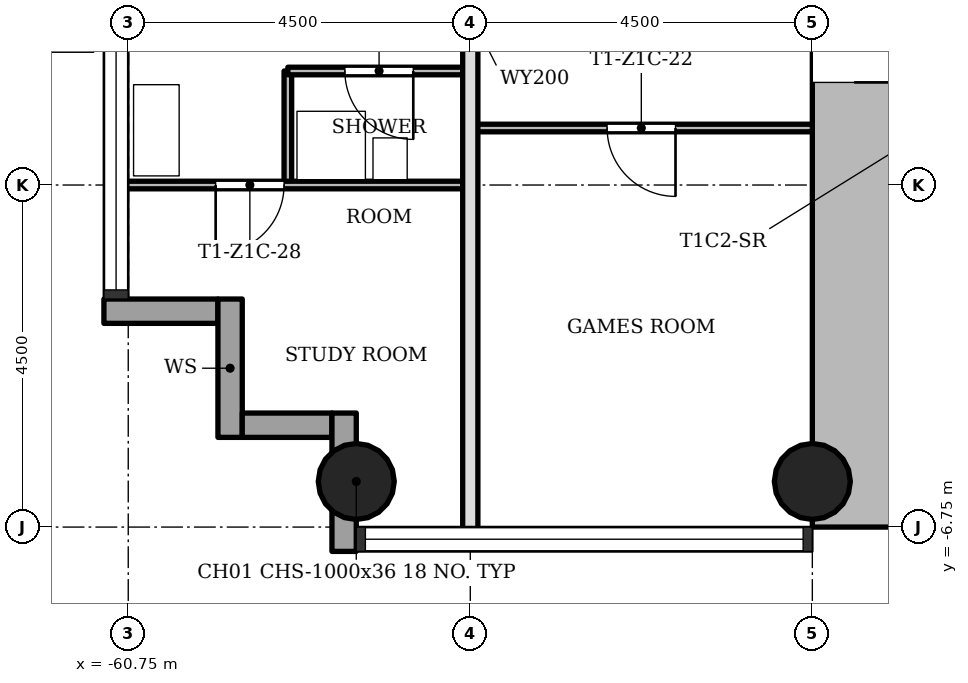
"""IFC4 building model, lengths in metres.
Left out: names, types, materials, properties, quantities, classifications, styles, units other than length and angle.
Written with IfcOpenShell. Run it as: python <this file> out.ifc"""

import sys

from ifc_helpers import new_model, si_unit, direction, frame, frame_2d, origin, origin_2d, place, context, subcontext, project, spatial, rectangle, hollow_circle, extrude, element, fill, save


model = new_model("IFC4")
c1 = context("Model", 3, precision=1e-05, world=origin(), true_north=direction((0.0, 1.0)))
c2 = subcontext(c1, "Body", "Model", "MODEL_VIEW")
j1 = project(units=[si_unit("LENGTHUNIT", "METRE"), si_unit("PLANEANGLEUNIT", "RADIAN")], contexts=[c1])
p1 = place(None, origin())
s1 = spatial("IfcSite", under=j1, at=p1, CompositionType="ELEMENT")
p2 = place(p1, origin())
s2 = spatial("IfcBuilding", under=s1, at=p2, CompositionType="ELEMENT")
p3 = place(p2, frame((0.0, 0.0, 48.3)))
s3 = spatial("IfcBuildingStorey", under=s2, at=p3, CompositionType="ELEMENT", Elevation=48.3)
p4 = place(p3, frame((-51.2, 5.65, 0.0), z_axis=(0.0, 0.0, 1.0), x_axis=(0.0, -1.0, 0.0)))
e1 = element("IfcWall", 1, at=p4, inside=s3, PredefinedType="SHEAR", context=c2, shape_type="SweptSolid", body=[
    extrude(rectangle(XDim=12.4, YDim=1.1, at=frame_2d((6.2, 0.0))), origin(), (0.0, 0.0, 1.0), 3.4),
])
p5 = place(p4, frame((4.75, 0.0, 0.0)))
e2 = element("IfcOpeningElement", 2, at=p5, cuts=e1, PredefinedType="OPENING", context=c2, shape_type="SweptSolid", body=[
    extrude(rectangle(XDim=1.8, YDim=2.1, at=frame_2d((0.9, 1.05))), frame((0.0, 0.56, 0.0), z_axis=(0.0, -1.0, 0.0), x_axis=(1.0, 0.0, 0.0)), (0.0, 0.0, 1.0), 1.12),
])
for number, where, z_axis, x_axis in (
    (3, (-51.75, -6.15, 0.0), (0.0, 0.0, 1.0), (1.0, 0.0, 0.0)),
    (4, (-57.75, -6.15, 0.0), (0.0, 0.0, 1.0), (1.0, 0.0, 0.0)),
):
    element("IfcColumn", number, at=place(p3, frame(where, z_axis=z_axis, x_axis=x_axis)), inside=s3, PredefinedType="COLUMN", context=c2, shape_type="SweptSolid", body=[
        extrude(hollow_circle(Radius=0.5, WallThickness=0.036, at=origin_2d()), origin(), (0.0, 0.0, 1.0), 3.4),
    ])
p6 = place(p3, frame((-61.07, -3.91, -0.3), z_axis=(0.0, 0.0, 1.0), x_axis=(1.0, 0.0, 0.0)))
e5 = element("IfcWall", 5, at=p6, inside=s3, PredefinedType="STANDARD", context=c2, shape_type="SweptSolid", body=[
    extrude(rectangle(XDim=1.5, YDim=0.32, at=frame_2d((0.75, 0.0))), origin(), (0.0, 0.0, 1.0), 3.4),
])
p7 = place(p3, frame((-59.41, -3.75, -0.3), z_axis=(0.0, 0.0, 1.0), x_axis=(0.0, -1.0, 0.0)))
e6 = element("IfcWall", 6, at=p7, inside=s3, PredefinedType="STANDARD", context=c2, shape_type="SweptSolid", body=[
    extrude(rectangle(XDim=1.82, YDim=0.32, at=frame_2d((0.91, 0.0))), origin(), (0.0, 0.0, 1.0), 3.4),
])
p8 = place(p3, frame((-59.25, -5.41, -0.3), z_axis=(0.0, 0.0, 1.0), x_axis=(1.0, 0.0, 0.0)))
e7 = element("IfcWall", 7, at=p8, inside=s3, PredefinedType="STANDARD", context=c2, shape_type="SweptSolid", body=[
    extrude(rectangle(XDim=1.18, YDim=0.32, at=frame_2d((0.59, 0.0))), origin(), (0.0, 0.0, 1.0), 3.4),
])
p9 = place(p3, frame((-57.91, -5.25, -0.3), z_axis=(0.0, 0.0, 1.0), x_axis=(0.0, -1.0, 0.0)))
e8 = element("IfcWall", 8, at=p9, inside=s3, PredefinedType="STANDARD", context=c2, shape_type="SweptSolid", body=[
    extrude(rectangle(XDim=1.82, YDim=0.32, at=frame_2d((0.91, 0.0))), origin(), (0.0, 0.0, 1.0), 3.4),
])
p10 = place(p3, frame((-58.65, -2.25, 0.0), z_axis=(0.0, 0.0, 1.0), x_axis=(0.0, 1.0, 0.0)))
e9 = element("IfcWall", 9, at=p10, inside=s3, PredefinedType="PARTITIONING", context=c2, shape_type="SweptSolid", body=[
    extrude(rectangle(XDim=1.5, YDim=0.1, at=frame_2d((0.75, 0.0))), origin(), (0.0, 0.0, 1.0), 3.0),
])
p11 = place(p3, frame((-56.25, -6.85, 0.0), z_axis=(0.0, 0.0, 1.0), x_axis=(0.0, 1.0, 0.0)))
e10 = element("IfcWall", 10, at=p11, inside=s3, PredefinedType="SOLIDWALL", context=c2, shape_type="SweptSolid", body=[
    extrude(rectangle(XDim=13.7, YDim=0.2, at=frame_2d((6.85, 0.0))), origin(), (0.0, 0.0, 1.0), 3.0),
])
p12 = place(p11, frame((6.4, 0.0, 0.0)))
e11 = element("IfcOpeningElement", 11, at=p12, cuts=e10, PredefinedType="OPENING", context=c2, shape_type="SweptSolid", body=[
    extrude(rectangle(XDim=0.9, YDim=2.1, at=frame_2d((0.45, 1.05))), frame((0.0, 0.11, 0.0), z_axis=(0.0, -1.0, 0.0), x_axis=(1.0, 0.0, 0.0)), (0.0, 0.0, 1.0), 0.22),
])
p13 = place(p3, frame((-60.85, -2.25, 0.0), z_axis=(0.0, 0.0, 1.0), x_axis=(1.0, 0.0, 0.0)))
e12 = element("IfcWall", 12, at=p13, inside=s3, PredefinedType="PARTITIONING", context=c2, shape_type="SweptSolid", body=[
    extrude(rectangle(XDim=4.6, YDim=0.1, at=frame_2d((2.3, 0.0))), origin(), (0.0, 0.0, 1.0), 3.0),
])
p14 = place(p13, frame((1.25, 0.0, 0.0)))
e13 = element("IfcOpeningElement", 13, at=p14, cuts=e12, PredefinedType="OPENING", context=c2, shape_type="SweptSolid", body=[
    extrude(rectangle(XDim=0.9, YDim=2.1, at=frame_2d((0.45, 1.05))), frame((0.0, 0.06, 0.0), z_axis=(0.0, -1.0, 0.0), x_axis=(1.0, 0.0, 0.0)), (0.0, 0.0, 1.0), 0.12),
])
p15 = place(p3, frame((-56.25, -1.5, 0.0), z_axis=(0.0, 0.0, 1.0), x_axis=(1.0, 0.0, 0.0)))
e14 = element("IfcWall", 14, at=p15, inside=s3, PredefinedType="PARTITIONING", context=c2, shape_type="SweptSolid", body=[
    extrude(rectangle(XDim=4.5, YDim=0.1, at=frame_2d((2.25, 0.0))), origin(), (0.0, 0.0, 1.0), 3.0),
])
p16 = place(p15, frame((1.8, 0.0, 0.0)))
e15 = element("IfcOpeningElement", 15, at=p16, cuts=e14, PredefinedType="OPENING", context=c2, shape_type="SweptSolid", body=[
    extrude(rectangle(XDim=0.9, YDim=2.1, at=frame_2d((0.45, 1.05))), frame((0.0, 0.06, 0.0), z_axis=(0.0, -1.0, 0.0), x_axis=(1.0, 0.0, 0.0)), (0.0, 0.0, 1.0), 0.12),
])
p17 = place(p3, frame((-58.65, -0.75, 0.0), z_axis=(0.0, 0.0, 1.0), x_axis=(1.0, 0.0, 0.0)))
e16 = element("IfcWall", 16, at=p17, inside=s3, PredefinedType="PARTITIONING", context=c2, shape_type="SweptSolid", body=[
    extrude(rectangle(XDim=2.4, YDim=0.1, at=frame_2d((1.2, 0.0))), origin(), (0.0, 0.0, 1.0), 3.0),
])
p18 = place(p17, frame((0.75, 0.0, 0.0)))
e17 = element("IfcOpeningElement", 17, at=p18, cuts=e16, PredefinedType="OPENING", context=c2, shape_type="SweptSolid", body=[
    extrude(rectangle(XDim=0.9, YDim=2.1, at=frame_2d((0.45, 1.05))), frame((0.0, 0.06, 0.0), z_axis=(0.0, -1.0, 0.0), x_axis=(1.0, 0.0, 0.0)), (0.0, 0.0, 1.0), 0.12),
])
p19 = place(p16, origin())
e18 = element("IfcDoor", 18, at=p19, inside=s3, OperationType="SINGLE_SWING_RIGHT", PredefinedType="DOOR", context=c2, shape_type="SweptSolid", body=[
    extrude(rectangle(XDim=0.9, YDim=2.1, at=frame_2d((0.45, 1.05))), frame((0.0, 0.025, 0.0), z_axis=(0.0, -1.0, 0.0), x_axis=(1.0, 0.0, 0.0)), (0.0, 0.0, 1.0), 0.05),
])
fill(e15, e18)
p20 = place(p18, origin())
e19 = element("IfcDoor", 19, at=p20, inside=s3, OperationType="SINGLE_SWING_RIGHT", PredefinedType="DOOR", context=c2, shape_type="SweptSolid", body=[
    extrude(rectangle(XDim=0.9, YDim=2.1, at=frame_2d((0.45, 1.05))), frame((0.0, 0.025, 0.0), z_axis=(0.0, -1.0, 0.0), x_axis=(1.0, 0.0, 0.0)), (0.0, 0.0, 1.0), 0.05),
])
fill(e17, e19)
p21 = place(p14, origin())
e20 = element("IfcDoor", 20, at=p21, inside=s3, OperationType="SINGLE_SWING_LEFT", PredefinedType="DOOR", context=c2, shape_type="SweptSolid", body=[
    extrude(rectangle(XDim=0.9, YDim=2.1, at=frame_2d((0.45, 1.05))), frame((0.0, 0.025, 0.0), z_axis=(0.0, -1.0, 0.0), x_axis=(1.0, 0.0, 0.0)), (0.0, 0.0, 1.0), 0.05),
])
fill(e13, e20)
p22 = place(p5, origin())
e21 = element("IfcDoor", 21, at=p22, inside=s3, OperationType="SINGLE_SWING_LEFT", PredefinedType="DOOR", context=c2, shape_type="SweptSolid", body=[
    extrude(rectangle(XDim=1.8, YDim=2.1, at=frame_2d((0.9, 1.05))), frame((0.0, 0.025, 0.0), z_axis=(0.0, -1.0, 0.0), x_axis=(1.0, 0.0, 0.0)), (0.0, 0.0, 1.0), 0.05),
])
fill(e2, e21)
save(model, sys.argv[1])
